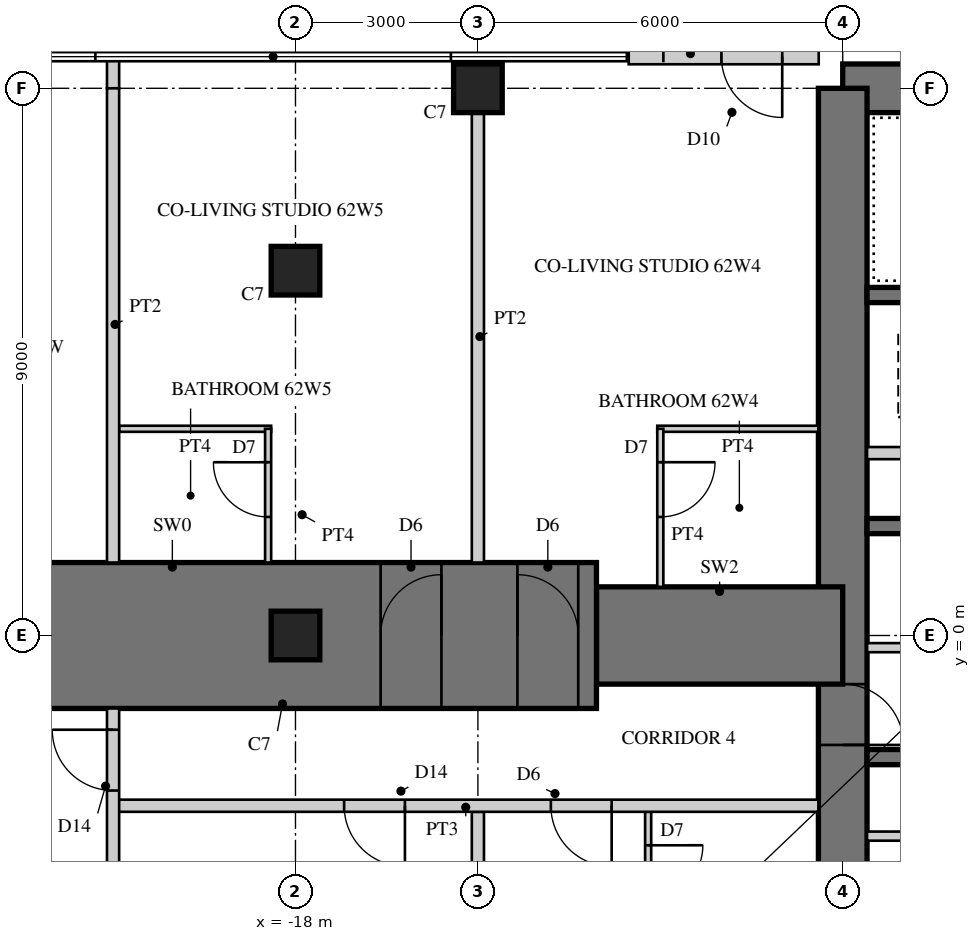
"""IFC4 building model, lengths in metres.
Left out: names, types, materials, properties, quantities, classifications, styles, units other than length and angle.
Written with IfcOpenShell. Run it as: python <this file> out.ifc"""

import sys

from ifc_helpers import new_model, si_unit, direction, frame, frame_2d, origin, origin_2d, place, context, subcontext, project, spatial, rectangle, hollow_rectangle, extrude, element, fill, save


model = new_model("IFC4")
c1 = context("Model", 3, precision=1e-05, world=origin(), true_north=direction((0.0, 1.0)))
c2 = subcontext(c1, "Body", "Model", "MODEL_VIEW")
j1 = project(units=[si_unit("LENGTHUNIT", "METRE"), si_unit("PLANEANGLEUNIT", "RADIAN")], contexts=[c1])
p1 = place(None, origin())
s1 = spatial("IfcSite", under=j1, at=p1, CompositionType="ELEMENT")
p2 = place(p1, origin())
s2 = spatial("IfcBuilding", under=s1, at=p2, CompositionType="ELEMENT")
p3 = place(p2, frame((0.0, 0.0, 242.5)))
s3 = spatial("IfcBuildingStorey", under=s2, at=p3, CompositionType="ELEMENT", Elevation=242.5)
p4 = place(p3, frame((9.0, 9.0, 0.0), z_axis=(0.0, 0.0, 1.0), x_axis=(-1.0, 0.0, 0.0)))
e1 = element("IfcWall", 1, at=p4, inside=s3, PredefinedType="SHEAR", context=c2, shape_type="SweptSolid", body=[
    extrude(rectangle(XDim=18.0, YDim=0.8, at=frame_2d((9.0, 0.0))), origin(), (0.0, 0.0, 1.0), 3.4),
])
p5 = place(p4, frame((9.8, 0.0, 0.0)))
e2 = element("IfcOpeningElement", 2, at=p5, cuts=e1, PredefinedType="OPENING", context=c2, shape_type="SweptSolid", body=[
    extrude(rectangle(XDim=1.0, YDim=2.4, at=frame_2d((0.5, 1.2))), frame((0.0, 0.41, 0.0), z_axis=(0.0, -1.0, 0.0), x_axis=(1.0, 0.0, 0.0)), (0.0, 0.0, 1.0), 0.82),
])
p6 = place(p3, frame((-9.0, 9.0, 0.0), z_axis=(0.0, 0.0, 1.0), x_axis=(0.0, -1.0, 0.0)))
e3 = element("IfcWall", 3, at=p6, inside=s3, PredefinedType="SHEAR", context=c2, shape_type="SweptSolid", body=[
    extrude(rectangle(XDim=18.0, YDim=0.8, at=frame_2d((9.0, 0.0))), origin(), (0.0, 0.0, 1.0), 3.4),
])
p7 = place(p6, frame((9.8, 0.0, 0.0)))
e4 = element("IfcOpeningElement", 4, at=p7, cuts=e3, PredefinedType="OPENING", context=c2, shape_type="SweptSolid", body=[
    extrude(rectangle(XDim=1.0, YDim=2.4, at=frame_2d((0.5, 1.2))), frame((0.0, 0.41, 0.0), z_axis=(0.0, -1.0, 0.0), x_axis=(1.0, 0.0, 0.0)), (0.0, 0.0, 1.0), 0.82),
])
p8 = place(p3, frame((-2.125, 1.8, 0.0), z_axis=(0.0, 0.0, 1.0), x_axis=(-1.0, 0.0, 0.0)))
e5 = element("IfcWall", 5, at=p8, inside=s3, PredefinedType="SHEAR", context=c2, shape_type="SweptSolid", body=[
    extrude(rectangle(XDim=6.475, YDim=0.25, at=frame_2d((3.238, 0.0))), origin(), (0.0, 0.0, 1.0), 3.4),
])
p9 = place(p3, frame((-2.125, 5.6, 0.0), z_axis=(0.0, 0.0, 1.0), x_axis=(-1.0, 0.0, 0.0)))
e6 = element("IfcWall", 6, at=p9, inside=s3, PredefinedType="SHEAR", context=c2, shape_type="SweptSolid", body=[
    extrude(rectangle(XDim=6.475, YDim=0.25, at=frame_2d((3.238, 0.0))), origin(), (0.0, 0.0, 1.0), 3.4),
])
p10 = place(p9, frame((0.175, 0.0, 0.0)))
e7 = element("IfcOpeningElement", 7, at=p10, cuts=e6, PredefinedType="OPENING", context=c2, shape_type="SweptSolid", body=[
    extrude(rectangle(XDim=1.0, YDim=2.1, at=frame_2d((0.5, 1.05))), frame((0.0, 0.135, 0.0), z_axis=(0.0, -1.0, 0.0), x_axis=(1.0, 0.0, 0.0)), (0.0, 0.0, 1.0), 0.27),
])
p11 = place(p3, frame((-5.725, 3.0, 0.0), z_axis=(0.0, 0.0, 1.0), x_axis=(-1.0, 0.0, 0.0)))
e8 = element("IfcWall", 8, at=p11, inside=s3, PredefinedType="PARTITIONING", context=c2, shape_type="SweptSolid", body=[
    extrude(rectangle(XDim=2.875, YDim=0.2, at=frame_2d((1.438, 0.0))), origin(), (0.0, 0.0, 1.0), 3.4),
])
p12 = place(p3, frame((-1.925, -2.0, 0.0), z_axis=(0.0, 0.0, 1.0), x_axis=(-1.0, 0.0, 0.0)))
e9 = element("IfcWall", 9, at=p12, inside=s3, PredefinedType="SHEAR", context=c2, shape_type="SweptSolid", body=[
    extrude(rectangle(XDim=6.675, YDim=0.25, at=frame_2d((3.337, 0.0))), origin(), (0.0, 0.0, 1.0), 3.4),
])
p13 = place(p3, frame((-1.925, -3.3, 0.0), z_axis=(0.0, 0.0, 1.0), x_axis=(-1.0, 0.0, 0.0)))
e10 = element("IfcWall", 10, at=p13, inside=s3, PredefinedType="PARTITIONING", context=c2, shape_type="SweptSolid", body=[
    extrude(rectangle(XDim=6.675, YDim=0.15, at=frame_2d((3.337, 0.0))), origin(), (0.0, 0.0, 1.0), 3.4),
])
p14 = place(p13, frame((0.075, 0.0, 0.0)))
e11 = element("IfcOpeningElement", 11, at=p14, cuts=e10, PredefinedType="OPENING", context=c2, shape_type="SweptSolid", body=[
    extrude(rectangle(XDim=0.8, YDim=2.1, at=frame_2d((0.4, 1.05))), frame((0.0, 0.085, 0.0), z_axis=(0.0, -1.0, 0.0), x_axis=(1.0, 0.0, 0.0)), (0.0, 0.0, 1.0), 0.17),
])
p15 = place(p13, frame((3.675, 0.0, 0.0)))
e12 = element("IfcOpeningElement", 12, at=p15, cuts=e10, PredefinedType="OPENING", context=c2, shape_type="SweptSolid", body=[
    extrude(rectangle(XDim=0.8, YDim=2.1, at=frame_2d((0.4, 1.05))), frame((0.0, 0.085, 0.0), z_axis=(0.0, -1.0, 0.0), x_axis=(1.0, 0.0, 0.0)), (0.0, 0.0, 1.0), 0.17),
])
p16 = place(p3, frame((-9.0, 0.0, 0.0), z_axis=(0.0, 0.0, 1.0), x_axis=(-1.0, 0.0, 0.0)))
e13 = element("IfcWall", 13, at=p16, inside=s3, PredefinedType="SHEAR", context=c2, shape_type="SweptSolid", body=[
    extrude(rectangle(XDim=4.05, YDim=1.6, at=frame_2d((2.025, 0.0))), origin(), (0.0, 0.0, 1.0), 3.4),
])
p17 = place(p3, frame((-13.05, 0.0, 0.0), z_axis=(0.0, 0.0, 1.0), x_axis=(-1.0, 0.0, 0.0)))
e14 = element("IfcWall", 14, at=p17, inside=s3, PredefinedType="SHEAR", context=c2, shape_type="SweptSolid", body=[
    extrude(rectangle(XDim=13.95, YDim=2.4, at=frame_2d((6.975, 0.0))), origin(), (0.0, 0.0, 1.0), 3.4),
])
p18 = place(p17, frame((0.3, 0.0, 0.0)))
e15 = element("IfcOpeningElement", 15, at=p18, cuts=e14, PredefinedType="OPENING", context=c2, shape_type="SweptSolid", body=[
    extrude(rectangle(XDim=1.0, YDim=2.15, at=frame_2d((0.5, 1.075))), frame((0.0, 1.21, 0.0), z_axis=(0.0, -1.0, 0.0), x_axis=(1.0, 0.0, 0.0)), (0.0, 0.0, 1.0), 2.42),
])
p19 = place(p17, frame((2.55, 0.0, 0.0)))
e16 = element("IfcOpeningElement", 16, at=p19, cuts=e14, PredefinedType="OPENING", context=c2, shape_type="SweptSolid", body=[
    extrude(rectangle(XDim=1.0, YDim=2.15, at=frame_2d((0.5, 1.075))), frame((0.0, 1.21, 0.0), z_axis=(0.0, -1.0, 0.0), x_axis=(1.0, 0.0, 0.0)), (0.0, 0.0, 1.0), 2.42),
])
p20 = place(p17, frame((9.25, 0.0, 0.0)))
e17 = element("IfcOpeningElement", 17, at=p20, cuts=e14, PredefinedType="OPENING", context=c2, shape_type="SweptSolid", body=[
    extrude(rectangle(XDim=1.0, YDim=2.2, at=frame_2d((0.5, 1.1))), frame((0.0, 1.21, 0.0), z_axis=(0.0, -1.0, 0.0), x_axis=(1.0, 0.0, 0.0)), (0.0, 0.0, 1.0), 2.42),
])
for number, where, z_axis, x_axis in (
    (18, (-15.0, 9.0, 0.0), (0.0, 0.0, 1.0), (1.0, 0.0, 0.0)),
    (19, (-18.0, 6.0, 0.0), (0.0, 0.0, 1.0), (1.0, 0.0, 0.0)),
    (20, (-18.0, 0.0, 0.0), (0.0, 0.0, 1.0), (1.0, 0.0, 0.0)),
):
    element("IfcColumn", number, at=place(p3, frame(where, z_axis=z_axis, x_axis=x_axis)), inside=s3, PredefinedType="COLUMN", context=c2, shape_type="SweptSolid", body=[
        extrude(rectangle(XDim=0.8, YDim=0.8, at=origin_2d()), origin(), (0.0, 0.0, 1.0), 3.4),
    ])
p21 = place(p3, frame((-9.395, 9.52, 0.0), z_axis=(0.0, 0.0, 1.0), x_axis=(-1.0, 0.0, 0.0)))
e21 = element("IfcWall", 21, at=p21, inside=s3, PredefinedType="SOLIDWALL", context=c2, shape_type="SweptSolid", body=[
    extrude(rectangle(XDim=3.125, YDim=0.25, at=frame_2d((1.562, 0.0))), origin(), (0.0, 0.0, 1.0), 3.22),
])
p22 = place(p21, frame((0.6, 0.0, 0.0)))
e22 = element("IfcOpeningElement", 22, at=p22, cuts=e21, PredefinedType="OPENING", context=c2, shape_type="SweptSolid", body=[
    extrude(rectangle(XDim=1.0, YDim=2.2, at=frame_2d((0.5, 1.1))), frame((0.0, 0.135, 0.0), z_axis=(0.0, -1.0, 0.0), x_axis=(1.0, 0.0, 0.0)), (0.0, 0.0, 1.0), 0.27),
])
p23 = place(p3, frame((-2.325, -0.2, 0.0), z_axis=(0.0, 0.0, 1.0), x_axis=(-1.0, 0.0, 0.0)))
e23 = element("IfcWall", 23, at=p23, inside=s3, PredefinedType="PARTITIONING", context=c2, shape_type="SweptSolid", body=[
    extrude(rectangle(XDim=6.275, YDim=0.15, at=frame_2d((3.138, 0.0))), origin(), (0.0, 0.0, 1.0), 3.22),
])
p24 = place(p23, frame((0.4, 0.0, 0.0)))
e24 = element("IfcOpeningElement", 24, at=p24, cuts=e23, PredefinedType="OPENING", context=c2, shape_type="SweptSolid", body=[
    extrude(rectangle(XDim=1.0, YDim=2.1, at=frame_2d((0.5, 1.05))), frame((0.0, 0.085, 0.0), z_axis=(0.0, -1.0, 0.0), x_axis=(1.0, 0.0, 0.0)), (0.0, 0.0, 1.0), 0.17),
])
p25 = place(p3, frame((-12.2, -2.9, 0.0), z_axis=(0.0, 0.0, 1.0), x_axis=(0.0, -1.0, 0.0)))
e25 = element("IfcWall", 25, at=p25, inside=s3, PredefinedType="PARTITIONING", context=c2, shape_type="SweptSolid", body=[
    extrude(rectangle(XDim=2.6, YDim=0.1, at=frame_2d((1.3, 0.0))), origin(), (0.0, 0.0, 1.0), 3.22),
])
p26 = place(p25, frame((0.55, 0.0, 0.0)))
e26 = element("IfcOpeningElement", 26, at=p26, cuts=e25, PredefinedType="OPENING", context=c2, shape_type="SweptSolid", body=[
    extrude(rectangle(XDim=0.9, YDim=2.1, at=frame_2d((0.45, 1.05))), frame((0.0, 0.06, 0.0), z_axis=(0.0, -1.0, 0.0), x_axis=(1.0, 0.0, 0.0)), (0.0, 0.0, 1.0), 0.12),
])
p27 = place(p3, frame((-9.4, 3.4, 0.0), z_axis=(0.0, 0.0, 1.0), x_axis=(-1.0, 0.0, 0.0)))
e27 = element("IfcWall", 27, at=p27, inside=s3, PredefinedType="PARTITIONING", context=c2, shape_type="SweptSolid", body=[
    extrude(rectangle(XDim=2.65, YDim=0.1, at=frame_2d((1.325, 0.0))), origin(), (0.0, 0.0, 1.0), 3.22),
])
p28 = place(p3, frame((-12.0, 3.4, 0.0), z_axis=(0.0, 0.0, 1.0), x_axis=(0.0, -1.0, 0.0)))
e28 = element("IfcWall", 28, at=p28, inside=s3, PredefinedType="PARTITIONING", context=c2, shape_type="SweptSolid", body=[
    extrude(rectangle(XDim=2.6, YDim=0.1, at=frame_2d((1.3, 0.0))), origin(), (0.0, 0.0, 1.0), 3.22),
])
p29 = place(p28, frame((0.55, 0.0, 0.0)))
e29 = element("IfcOpeningElement", 29, at=p29, cuts=e28, PredefinedType="OPENING", context=c2, shape_type="SweptSolid", body=[
    extrude(rectangle(XDim=0.9, YDim=2.1, at=frame_2d((0.45, 1.05))), frame((0.0, 0.06, 0.0), z_axis=(0.0, -1.0, 0.0), x_axis=(1.0, 0.0, 0.0)), (0.0, 0.0, 1.0), 0.12),
])
p30 = place(p3, frame((-15.0, -2.9, 0.0), z_axis=(0.0, 0.0, 1.0), x_axis=(0.0, -1.0, 0.0)))
e30 = element("IfcWall", 30, at=p30, inside=s3, PredefinedType="SOLIDWALL", context=c2, shape_type="SweptSolid", body=[
    extrude(rectangle(XDim=5.7, YDim=0.2, at=frame_2d((2.85, 0.0))), origin(), (0.0, 0.0, 1.0), 2.52),
])
p31 = place(p3, frame((-15.0, 8.6, 0.0), z_axis=(0.0, 0.0, 1.0), x_axis=(0.0, -1.0, 0.0)))
e31 = element("IfcWall", 31, at=p31, inside=s3, PredefinedType="SOLIDWALL", context=c2, shape_type="SweptSolid", body=[
    extrude(rectangle(XDim=7.4, YDim=0.2, at=frame_2d((3.7, 0.0))), origin(), (0.0, 0.0, 1.0), 2.52),
])
p32 = place(p3, frame((-18.4, 3.4, 0.0), z_axis=(0.0, 0.0, 1.0), x_axis=(-1.0, 0.0, 0.0)))
e32 = element("IfcWall", 32, at=p32, inside=s3, PredefinedType="PARTITIONING", context=c2, shape_type="SweptSolid", body=[
    extrude(rectangle(XDim=2.5, YDim=0.1, at=frame_2d((1.25, 0.0))), origin(), (0.0, 0.0, 1.0), 3.22),
])
p33 = place(p3, frame((-18.45, 3.4, 0.0), z_axis=(0.0, 0.0, 1.0), x_axis=(0.0, -1.0, 0.0)))
e33 = element("IfcWall", 33, at=p33, inside=s3, PredefinedType="PARTITIONING", context=c2, shape_type="SweptSolid", body=[
    extrude(rectangle(XDim=2.2, YDim=0.1, at=frame_2d((1.1, 0.0))), origin(), (0.0, 0.0, 1.0), 3.22),
])
p34 = place(p33, frame((0.55, 0.0, 0.0)))
e34 = element("IfcOpeningElement", 34, at=p34, cuts=e33, PredefinedType="OPENING", context=c2, shape_type="SweptSolid", body=[
    extrude(rectangle(XDim=0.9, YDim=2.1, at=frame_2d((0.45, 1.05))), frame((0.0, 0.06, 0.0), z_axis=(0.0, -1.0, 0.0), x_axis=(1.0, 0.0, 0.0)), (0.0, 0.0, 1.0), 0.12),
])
p35 = place(p3, frame((-9.4, -2.8, 0.0), z_axis=(0.0, 0.0, 1.0), x_axis=(-1.0, 0.0, 0.0)))
e35 = element("IfcWall", 35, at=p35, inside=s3, PredefinedType="SOLIDWALL", context=c2, shape_type="SweptSolid", body=[
    extrude(rectangle(XDim=11.6, YDim=0.2, at=frame_2d((5.8, 0.0))), origin(), (0.0, 0.0, 1.0), 3.22),
])
p36 = place(p35, frame((3.4, 0.0, 0.0)))
e36 = element("IfcOpeningElement", 36, at=p36, cuts=e35, PredefinedType="OPENING", context=c2, shape_type="SweptSolid", body=[
    extrude(rectangle(XDim=1.0, YDim=2.15, at=frame_2d((0.5, 1.075))), frame((0.0, 0.11, 0.0), z_axis=(0.0, -1.0, 0.0), x_axis=(1.0, 0.0, 0.0)), (0.0, 0.0, 1.0), 0.22),
])
p37 = place(p35, frame((6.8, 0.0, 0.0)))
e37 = element("IfcOpeningElement", 37, at=p37, cuts=e35, PredefinedType="OPENING", context=c2, shape_type="SweptSolid", body=[
    extrude(rectangle(XDim=1.0, YDim=2.2, at=frame_2d((0.5, 1.1))), frame((0.0, 0.11, 0.0), z_axis=(0.0, -1.0, 0.0), x_axis=(1.0, 0.0, 0.0)), (0.0, 0.0, 1.0), 0.22),
])
p38 = place(p3, frame((-21.0, 9.48, 0.0), z_axis=(0.0, 0.0, 1.0), x_axis=(0.0, -1.0, 0.0)))
e38 = element("IfcWall", 38, at=p38, inside=s3, PredefinedType="SOLIDWALL", context=c2, shape_type="SweptSolid", body=[
    extrude(rectangle(XDim=0.48, YDim=0.2, at=frame_2d((0.24, 0.0))), origin(), (0.0, 0.0, 1.0), 3.22),
])
p39 = place(p3, frame((-21.0, 9.0, 0.0), z_axis=(0.0, 0.0, 1.0), x_axis=(0.0, -1.0, 0.0)))
e39 = element("IfcWall", 39, at=p39, inside=s3, PredefinedType="SOLIDWALL", context=c2, shape_type="SweptSolid", body=[
    extrude(rectangle(XDim=7.8, YDim=0.2, at=frame_2d((3.9, 0.0))), origin(), (0.0, 0.0, 1.0), 2.67),
])
p40 = place(p3, frame((-21.0, -1.2, 0.0), z_axis=(0.0, 0.0, 1.0), x_axis=(0.0, -1.0, 0.0)))
e40 = element("IfcWall", 40, at=p40, inside=s3, PredefinedType="SOLIDWALL", context=c2, shape_type="SweptSolid", body=[
    extrude(rectangle(XDim=7.8, YDim=0.2, at=frame_2d((3.9, 0.0))), origin(), (0.0, 0.0, 1.0), 2.67),
])
p41 = place(p40, frame((0.35, 0.0, 0.0)))
e41 = element("IfcOpeningElement", 41, at=p41, cuts=e40, PredefinedType="OPENING", context=c2, shape_type="SweptSolid", body=[
    extrude(rectangle(XDim=1.0, YDim=2.2, at=frame_2d((0.5, 1.1))), frame((0.0, 0.11, 0.0), z_axis=(0.0, -1.0, 0.0), x_axis=(1.0, 0.0, 0.0)), (0.0, 0.0, 1.0), 0.22),
])
p42 = place(p22, origin())
e42 = element("IfcDoor", 42, at=p42, inside=s3, OperationType="SINGLE_SWING_LEFT", PredefinedType="DOOR", context=c2, shape_type="SweptSolid", body=[
    extrude(hollow_rectangle(XDim=1.0, YDim=2.2, WallThickness=0.06, at=frame_2d((0.5, 1.1))), frame((0.0, 0.025, 0.0), z_axis=(0.0, -1.0, 0.0), x_axis=(1.0, 0.0, 0.0)), (0.0, 0.0, 1.0), 0.05),
    extrude(rectangle(XDim=0.879, YDim=2.079, at=frame_2d((0.5, 1.1))), frame((0.0, 0.025, 0.0), z_axis=(0.0, -1.0, 0.0), x_axis=(1.0, 0.0, 0.0)), (0.0, 0.0, 1.0), 0.05),
])
fill(e22, e42)
p43 = place(p26, origin())
e43 = element("IfcDoor", 43, at=p43, inside=s3, OperationType="SINGLE_SWING_LEFT", PredefinedType="DOOR", context=c2, shape_type="SweptSolid", body=[
    extrude(rectangle(XDim=0.9, YDim=2.1, at=frame_2d((0.45, 1.05))), frame((0.0, 0.025, 0.0), z_axis=(0.0, -1.0, 0.0), x_axis=(1.0, 0.0, 0.0)), (0.0, 0.0, 1.0), 0.05),
])
fill(e26, e43)
p44 = place(p29, origin())
e44 = element("IfcDoor", 44, at=p44, inside=s3, OperationType="SINGLE_SWING_LEFT", PredefinedType="DOOR", context=c2, shape_type="SweptSolid", body=[
    extrude(rectangle(XDim=0.9, YDim=2.1, at=frame_2d((0.45, 1.05))), frame((0.0, 0.025, 0.0), z_axis=(0.0, -1.0, 0.0), x_axis=(1.0, 0.0, 0.0)), (0.0, 0.0, 1.0), 0.05),
])
fill(e29, e44)
p45 = place(p34, frame((0.9, 0.0, 0.0), z_axis=(0.0, 0.0, 1.0), x_axis=(-1.0, 0.0, 0.0)))
e45 = element("IfcDoor", 45, at=p45, inside=s3, OperationType="SINGLE_SWING_RIGHT", PredefinedType="DOOR", context=c2, shape_type="SweptSolid", body=[
    extrude(rectangle(XDim=0.9, YDim=2.1, at=frame_2d((0.45, 1.05))), frame((0.0, 0.025, 0.0), z_axis=(0.0, -1.0, 0.0), x_axis=(1.0, 0.0, 0.0)), (0.0, 0.0, 1.0), 0.05),
])
fill(e34, e45)
p46 = place(p36, origin())
e46 = element("IfcDoor", 46, at=p46, inside=s3, OperationType="SINGLE_SWING_LEFT", PredefinedType="DOOR", context=c2, shape_type="SweptSolid", body=[
    extrude(rectangle(XDim=1.0, YDim=2.15, at=frame_2d((0.5, 1.075))), frame((0.0, 0.025, 0.0), z_axis=(0.0, -1.0, 0.0), x_axis=(1.0, 0.0, 0.0)), (0.0, 0.0, 1.0), 0.05),
])
fill(e36, e46)
p47 = place(p37, origin())
e47 = element("IfcDoor", 47, at=p47, inside=s3, OperationType="SINGLE_SWING_LEFT", PredefinedType="DOOR", context=c2, shape_type="SweptSolid", body=[
    extrude(rectangle(XDim=1.0, YDim=2.2, at=frame_2d((0.5, 1.1))), frame((0.0, 0.025, 0.0), z_axis=(0.0, -1.0, 0.0), x_axis=(1.0, 0.0, 0.0)), (0.0, 0.0, 1.0), 0.05),
])
fill(e37, e47)
p48 = place(p41, frame((1.0, 0.0, 0.0), z_axis=(0.0, 0.0, 1.0), x_axis=(-1.0, 0.0, 0.0)))
e48 = element("IfcDoor", 48, at=p48, inside=s3, OperationType="SINGLE_SWING_RIGHT", PredefinedType="DOOR", context=c2, shape_type="SweptSolid", body=[
    extrude(rectangle(XDim=1.0, YDim=2.2, at=frame_2d((0.5, 1.1))), frame((0.0, 0.025, 0.0), z_axis=(0.0, -1.0, 0.0), x_axis=(1.0, 0.0, 0.0)), (0.0, 0.0, 1.0), 0.05),
])
fill(e41, e48)
p49 = place(p18, frame((1.0, 0.0, 0.0), z_axis=(0.0, 0.0, 1.0), x_axis=(-1.0, 0.0, 0.0)))
e49 = element("IfcDoor", 49, at=p49, inside=s3, OperationType="SINGLE_SWING_LEFT", PredefinedType="DOOR", context=c2, shape_type="SweptSolid", body=[
    extrude(rectangle(XDim=1.0, YDim=2.15, at=frame_2d((0.5, 1.075))), frame((0.0, 0.025, 0.0), z_axis=(0.0, -1.0, 0.0), x_axis=(1.0, 0.0, 0.0)), (0.0, 0.0, 1.0), 0.05),
])
fill(e15, e49)
p50 = place(p19, frame((1.0, 0.0, 0.0), z_axis=(0.0, 0.0, 1.0), x_axis=(-1.0, 0.0, 0.0)))
e50 = element("IfcDoor", 50, at=p50, inside=s3, OperationType="SINGLE_SWING_RIGHT", PredefinedType="DOOR", context=c2, shape_type="SweptSolid", body=[
    extrude(rectangle(XDim=1.0, YDim=2.15, at=frame_2d((0.5, 1.075))), frame((0.0, 0.025, 0.0), z_axis=(0.0, -1.0, 0.0), x_axis=(1.0, 0.0, 0.0)), (0.0, 0.0, 1.0), 0.05),
])
fill(e16, e50)
p51 = place(p7, origin())
e51 = element("IfcDoor", 51, at=p51, inside=s3, OperationType="SINGLE_SWING_RIGHT", PredefinedType="DOOR", context=c2, shape_type="SweptSolid", body=[
    extrude(rectangle(XDim=1.0, YDim=2.4, at=frame_2d((0.5, 1.2))), frame((0.0, 0.055, 0.0), z_axis=(0.0, -1.0, 0.0), x_axis=(1.0, 0.0, 0.0)), (0.0, 0.0, 1.0), 0.05),
])
fill(e4, e51)
save(model, sys.argv[1])
